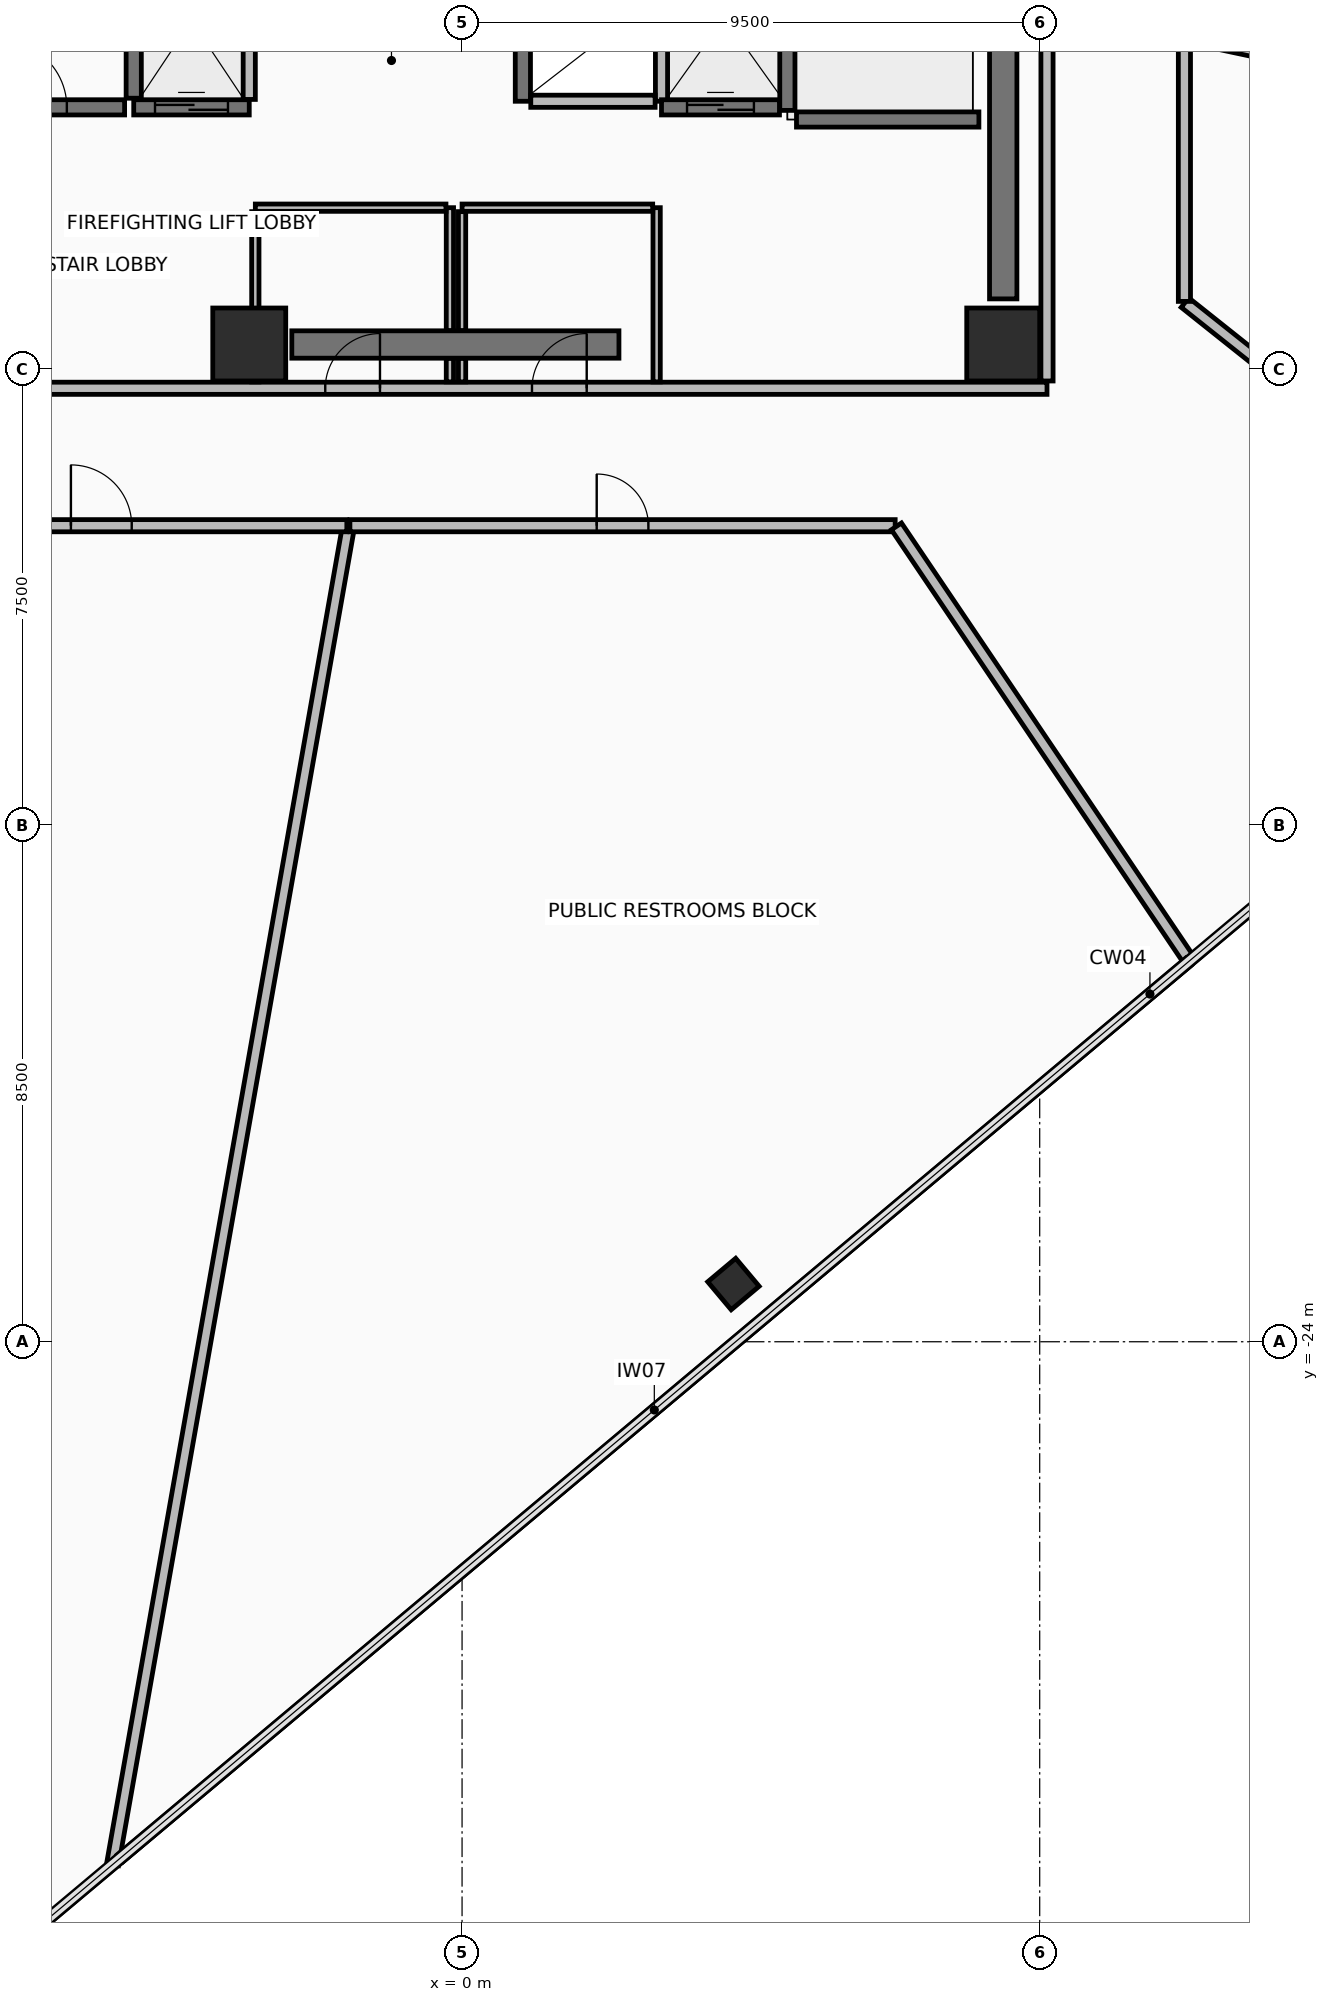
"""IFC4 building model, lengths in metres.
Left out: names, types, materials, properties, quantities, classifications, styles, units other than length and angle.
Written with IfcOpenShell. Run it as: python <this file> out.ifc"""

import sys

from ifc_helpers import new_model, si_unit, direction, frame, frame_2d, origin, origin_2d, place, context, subcontext, project, spatial, rectangle, hollow_rectangle, extrude, element, fill, save


model = new_model("IFC4")
c1 = context("Model", 3, precision=1e-05, world=origin(), true_north=direction((0.0, 1.0)))
c2 = subcontext(c1, "Body", "Model", "MODEL_VIEW")
j1 = project(units=[si_unit("LENGTHUNIT", "METRE"), si_unit("PLANEANGLEUNIT", "RADIAN")], contexts=[c1])
p1 = place(None, origin())
s1 = spatial("IfcSite", under=j1, at=p1, CompositionType="ELEMENT")
p2 = place(p1, origin())
s2 = spatial("IfcBuilding", under=s1, at=p2, CompositionType="ELEMENT")
p3 = place(p2, frame((0.0, 0.0, 181.3)))
s3 = spatial("IfcBuildingStorey", under=s2, at=p3, CompositionType="ELEMENT", Elevation=181.3)
for number, where, z_axis, x_axis in (
    (1, (-3.5, -7.6, 0.0), (0.0, 0.0, 1.0), (1.0, 0.0, 0.0)),
    (2, (8.9, -7.6, 0.0), (0.0, 0.0, 1.0), (1.0, 0.0, 0.0)),
):
    element("IfcColumn", number, at=place(p3, frame(where, z_axis=z_axis, x_axis=x_axis)), inside=s3, PredefinedType="COLUMN", context=c2, shape_type="SweptSolid", body=[
        extrude(rectangle(XDim=1.2, YDim=1.2, at=origin_2d()), origin(), (0.0, 0.0, 1.0), 3.6),
    ])
p4 = place(p3, frame((4.463, -23.051, 0.0), z_axis=(0.0, 0.0, 1.0), x_axis=(0.766043321242, 0.642788946685, 0.0)))
e3 = element("IfcColumn", 3, at=p4, inside=s3, PredefinedType="COLUMN", context=c2, shape_type="SweptSolid", body=[
    extrude(hollow_rectangle(XDim=0.6, YDim=0.6, WallThickness=0.036, at=origin_2d()), origin(), (0.0, 0.0, 1.0), 3.6),
])
p5 = place(p3, frame((-2.8, -7.6, 0.0), z_axis=(0.0, 0.0, 1.0), x_axis=(1.0, 0.0, 0.0)))
e4 = element("IfcWall", 4, at=p5, inside=s3, PredefinedType="SHEAR", context=c2, shape_type="SweptSolid", body=[
    extrude(rectangle(XDim=5.38, YDim=0.45, at=frame_2d((2.69, 0.0))), origin(), (0.0, 0.0, 1.0), 3.42),
])
p6 = place(p3, frame((8.9, -6.85, 0.0), z_axis=(0.0, 0.0, 1.0), x_axis=(0.0, 1.0, 0.0)))
e5 = element("IfcWall", 5, at=p6, inside=s3, PredefinedType="SHEAR", context=c2, shape_type="SweptSolid", body=[
    extrude(rectangle(XDim=10.7, YDim=0.45, at=frame_2d((5.35, 0.0))), origin(), (0.0, 0.0, 1.0), 3.42),
])
p7 = place(p3, frame((-9.62, -8.32, 0.0), z_axis=(0.0, 0.0, 1.0), x_axis=(1.0, 0.0, 0.0)))
e6 = element("IfcWall", 6, at=p7, inside=s3, PredefinedType="PARTITIONING", context=c2, shape_type="SweptSolid", body=[
    extrude(rectangle(XDim=19.24, YDim=0.2, at=frame_2d((9.62, 0.0))), origin(), (0.0, 0.0, 1.0), 2.865),
])
p8 = place(p7, frame((7.37, 0.0, 0.0)))
e7 = element("IfcOpeningElement", 7, at=p8, cuts=e6, PredefinedType="OPENING", context=c2, shape_type="SweptSolid", body=[
    extrude(rectangle(XDim=0.9, YDim=2.1, at=frame_2d((0.45, 1.05))), frame((0.0, 0.11, 0.0), z_axis=(0.0, -1.0, 0.0), x_axis=(1.0, 0.0, 0.0)), (0.0, 0.0, 1.0), 0.22),
])
p9 = place(p7, frame((10.77, 0.0, 0.0)))
e8 = element("IfcOpeningElement", 8, at=p9, cuts=e6, PredefinedType="OPENING", context=c2, shape_type="SweptSolid", body=[
    extrude(rectangle(XDim=0.9, YDim=2.1, at=frame_2d((0.45, 1.05))), frame((0.0, 0.11, 0.0), z_axis=(0.0, -1.0, 0.0), x_axis=(1.0, 0.0, 0.0)), (0.0, 0.0, 1.0), 0.22),
])
p10 = place(p3, frame((9.62, -8.2, 0.0), z_axis=(0.0, 0.0, 1.0), x_axis=(0.0, 1.0, 0.0)))
e9 = element("IfcWall", 9, at=p10, inside=s3, PredefinedType="PARTITIONING", context=c2, shape_type="SweptSolid", body=[
    extrude(rectangle(XDim=16.4, YDim=0.2, at=frame_2d((8.2, 0.0))), origin(), (0.0, 0.0, 1.0), 2.865),
])
p11 = place(p10, frame((12.65, 0.0, 0.0)))
e10 = element("IfcOpeningElement", 10, at=p11, cuts=e9, PredefinedType="OPENING", context=c2, shape_type="SweptSolid", body=[
    extrude(rectangle(XDim=1.1, YDim=2.15, at=frame_2d((0.55, 1.075))), frame((0.0, 0.11, 0.0), z_axis=(0.0, -1.0, 0.0), x_axis=(1.0, 0.0, 0.0)), (0.0, 0.0, 1.0), 0.22),
])
p12 = place(p3, frame((-5.4, -3.55, 0.0), z_axis=(0.0, 0.0, 1.0), x_axis=(0.0, 1.0, 0.0)))
e11 = element("IfcWall", 11, at=p12, inside=s3, PredefinedType="SHEAR", context=c2, shape_type="SweptSolid", body=[
    extrude(rectangle(XDim=7.3, YDim=0.25, at=frame_2d((3.65, 0.0))), origin(), (0.0, 0.0, 1.0), 3.42),
])
p13 = place(p3, frame((-8.5, -3.7, 0.0), z_axis=(0.0, 0.0, 1.0), x_axis=(1.0, 0.0, 0.0)))
e12 = element("IfcWall", 12, at=p13, inside=s3, PredefinedType="SHEAR", context=c2, shape_type="SweptSolid", body=[
    extrude(rectangle(XDim=2.95, YDim=0.25, at=frame_2d((1.475, 0.0))), origin(), (0.0, 0.0, 1.0), 3.42),
])
p14 = place(p13, frame((0.9, 0.0, 0.0)))
e13 = element("IfcOpeningElement", 13, at=p14, cuts=e12, PredefinedType="OPENING", context=c2, shape_type="SweptSolid", body=[
    extrude(rectangle(XDim=1.1, YDim=2.15, at=frame_2d((0.55, 1.075))), frame((0.0, 0.135, 0.0), z_axis=(0.0, -1.0, 0.0), x_axis=(1.0, 0.0, 0.0)), (0.0, 0.0, 1.0), 0.27),
])
p15 = place(p3, frame((5.35, -3.75, 0.0), z_axis=(0.0, 0.0, 1.0), x_axis=(0.0, 1.0, 0.0)))
e14 = element("IfcWall", 14, at=p15, inside=s3, PredefinedType="SHEAR", context=c2, shape_type="SweptSolid", body=[
    extrude(rectangle(XDim=7.3, YDim=0.25, at=frame_2d((3.65, 0.0))), origin(), (0.0, 0.0, 1.0), 3.42),
])
p16 = place(p3, frame((5.5, -3.9, 0.0), z_axis=(0.0, 0.0, 1.0), x_axis=(1.0, 0.0, 0.0)))
e15 = element("IfcWall", 15, at=p16, inside=s3, PredefinedType="SHEAR", context=c2, shape_type="SweptSolid", body=[
    extrude(rectangle(XDim=3.0, YDim=0.25, at=frame_2d((1.5, 0.0))), origin(), (0.0, 0.0, 1.0), 3.42),
])
p17 = place(p3, frame((1.0, -3.6, 0.0), z_axis=(0.0, 0.0, 1.0), x_axis=(0.0, 1.0, 0.0)))
e16 = element("IfcWall", 16, at=p17, inside=s3, PredefinedType="SHEAR", context=c2, shape_type="SweptSolid", body=[
    extrude(rectangle(XDim=1.8, YDim=0.25, at=frame_2d((0.9, 0.0))), origin(), (0.0, 0.0, 1.0), 3.42),
])
p18 = place(p3, frame((3.28, -3.6, 0.0), z_axis=(0.0, 0.0, 1.0), x_axis=(0.0, 1.0, 0.0)))
e17 = element("IfcWall", 17, at=p18, inside=s3, PredefinedType="PARTITIONING", context=c2, shape_type="SweptSolid", body=[
    extrude(rectangle(XDim=1.8, YDim=0.2, at=frame_2d((0.9, 0.0))), origin(), (0.0, 0.0, 1.0), 3.42),
])
p19 = place(p3, frame((1.13, -3.6, 0.0), z_axis=(0.0, 0.0, 1.0), x_axis=(1.0, 0.0, 0.0)))
e18 = element("IfcWall", 18, at=p19, inside=s3, PredefinedType="PARTITIONING", context=c2, shape_type="SweptSolid", body=[
    extrude(rectangle(XDim=2.045, YDim=0.2, at=frame_2d((1.022, 0.0))), origin(), (0.0, 0.0, 1.0), 3.42),
])
p20 = place(p3, frame((-5.4, -3.7, 0.0), z_axis=(0.0, 0.0, 1.0), x_axis=(1.0, 0.0, 0.0)))
e19 = element("IfcWall", 19, at=p20, inside=s3, PredefinedType="SHEAR", context=c2, shape_type="SweptSolid", body=[
    extrude(rectangle(XDim=1.9, YDim=0.25, at=frame_2d((0.95, 0.0))), origin(), (0.0, 0.0, 1.0), 3.42),
])
p21 = place(p20, frame((0.35, 0.0, 0.0)))
e20 = element("IfcOpeningElement", 20, at=p21, cuts=e19, PredefinedType="OPENING", context=c2, shape_type="SweptSolid", body=[
    extrude(rectangle(XDim=1.2, YDim=2.2, at=frame_2d((0.6, 1.1))), frame((0.0, 0.135, 0.0), z_axis=(0.0, -1.0, 0.0), x_axis=(1.0, 0.0, 0.0)), (0.0, 0.0, 1.0), 0.27),
])
p22 = place(p3, frame((-3.5, -3.57, 0.0), z_axis=(0.0, 0.0, 1.0), x_axis=(0.0, 1.0, 0.0)))
e21 = element("IfcWall", 21, at=p22, inside=s3, PredefinedType="PARTITIONING", context=c2, shape_type="SweptSolid", body=[
    extrude(rectangle(XDim=2.615, YDim=0.2, at=frame_2d((1.308, 0.0))), origin(), (0.0, 0.0, 1.0), 3.42),
])
p23 = place(p3, frame((3.28, -3.7, 0.0), z_axis=(0.0, 0.0, 1.0), x_axis=(1.0, 0.0, 0.0)))
e22 = element("IfcWall", 22, at=p23, inside=s3, PredefinedType="SHEAR", context=c2, shape_type="SweptSolid", body=[
    extrude(rectangle(XDim=1.94, YDim=0.25, at=frame_2d((0.97, 0.0))), origin(), (0.0, 0.0, 1.0), 3.42),
])
p24 = place(p23, frame((0.42, 0.0, 0.0)))
e23 = element("IfcOpeningElement", 23, at=p24, cuts=e22, PredefinedType="OPENING", context=c2, shape_type="SweptSolid", body=[
    extrude(rectangle(XDim=1.1, YDim=2.2, at=frame_2d((0.55, 1.1))), frame((0.0, 0.135, 0.0), z_axis=(0.0, -1.0, 0.0), x_axis=(1.0, 0.0, 0.0)), (0.0, 0.0, 1.0), 0.27),
])
p25 = place(p3, frame((-0.2, -8.215, 0.0), z_axis=(0.0, 0.0, 1.0), x_axis=(0.0, 1.0, 0.0)))
e24 = element("IfcWall", 24, at=p25, inside=s3, PredefinedType="PARTITIONING", context=c2, shape_type="SweptSolid", body=[
    extrude(rectangle(XDim=0.385, YDim=0.12, at=frame_2d((0.192, 0.0))), origin(), (0.0, 0.0, 1.0), 2.715),
])
p26 = place(p3, frame((-0.2, -7.37, 0.0), z_axis=(0.0, 0.0, 1.0), x_axis=(0.0, 1.0, 0.0)))
e25 = element("IfcWall", 25, at=p26, inside=s3, PredefinedType="PARTITIONING", context=c2, shape_type="SweptSolid", body=[
    extrude(rectangle(XDim=2.02, YDim=0.12, at=frame_2d((1.01, 0.0))), origin(), (0.0, 0.0, 1.0), 2.715),
])
p27 = place(p3, frame((-0.265, -5.35, 0.0), z_axis=(0.0, 0.0, 1.0), x_axis=(-1.0, 0.0, 0.0)))
e26 = element("IfcWall", 26, at=p27, inside=s3, PredefinedType="PARTITIONING", context=c2, shape_type="SweptSolid", body=[
    extrude(rectangle(XDim=3.135, YDim=0.12, at=frame_2d((1.567, 0.0))), origin(), (0.0, 0.0, 1.0), 2.715),
])
p28 = place(p3, frame((-3.4, -5.415, 0.0), z_axis=(0.0, 0.0, 1.0), x_axis=(0.0, -1.0, 0.0)))
e27 = element("IfcWall", 27, at=p28, inside=s3, PredefinedType="PARTITIONING", context=c2, shape_type="SweptSolid", body=[
    extrude(rectangle(XDim=2.8, YDim=0.12, at=frame_2d((1.4, 0.0))), origin(), (0.0, 0.0, 1.0), 2.715),
])
p29 = place(p3, frame((3.2, -8.215, 0.0), z_axis=(0.0, 0.0, 1.0), x_axis=(0.0, 1.0, 0.0)))
e28 = element("IfcWall", 28, at=p29, inside=s3, PredefinedType="PARTITIONING", context=c2, shape_type="SweptSolid", body=[
    extrude(rectangle(XDim=2.865, YDim=0.12, at=frame_2d((1.433, 0.0))), origin(), (0.0, 0.0, 1.0), 2.715),
])
p30 = place(p3, frame((3.135, -5.35, 0.0), z_axis=(0.0, 0.0, 1.0), x_axis=(-1.0, 0.0, 0.0)))
e29 = element("IfcWall", 29, at=p30, inside=s3, PredefinedType="PARTITIONING", context=c2, shape_type="SweptSolid", body=[
    extrude(rectangle(XDim=3.135, YDim=0.12, at=frame_2d((1.567, 0.0))), origin(), (0.0, 0.0, 1.0), 3.42),
])
p31 = place(p3, frame((0.0, -5.415, 0.0), z_axis=(0.0, 0.0, 1.0), x_axis=(0.0, -1.0, 0.0)))
e30 = element("IfcWall", 30, at=p31, inside=s3, PredefinedType="PARTITIONING", context=c2, shape_type="SweptSolid", body=[
    extrude(rectangle(XDim=1.955, YDim=0.12, at=frame_2d((0.978, 0.0))), origin(), (0.0, 0.0, 1.0), 2.715),
])
p32 = place(p3, frame((0.0, -7.83, 0.0), z_axis=(0.0, 0.0, 1.0), x_axis=(0.0, -1.0, 0.0)))
e31 = element("IfcWall", 31, at=p32, inside=s3, PredefinedType="PARTITIONING", context=c2, shape_type="SweptSolid", body=[
    extrude(rectangle(XDim=0.385, YDim=0.12, at=frame_2d((0.192, 0.0))), origin(), (0.0, 0.0, 1.0), 2.715),
])
p33 = place(p3, frame((-5.748, -32.598, 0.0), z_axis=(0.0, 0.0, 1.0), x_axis=(0.17364192413, 0.984808855659, 0.0)))
e32 = element("IfcWall", 32, at=p33, inside=s3, PredefinedType="PARTITIONING", context=c2, shape_type="SweptSolid", body=[
    extrude(rectangle(XDim=22.337, YDim=0.2, at=frame_2d((11.168, 0.0))), origin(), (0.0, 0.0, 1.0), 2.715),
])
p34 = place(p3, frame((-1.844, -10.58, 0.0), z_axis=(0.0, 0.0, 1.0), x_axis=(1.0, 0.0, 0.0)))
e33 = element("IfcWall", 33, at=p34, inside=s3, PredefinedType="PARTITIONING", context=c2, shape_type="SweptSolid", body=[
    extrude(rectangle(XDim=8.968, YDim=0.2, at=frame_2d((4.484, 0.0))), origin(), (0.0, 0.0, 1.0), 3.42),
])
p35 = place(p34, frame((4.059, 0.0, 0.0)))
e34 = element("IfcOpeningElement", 34, at=p35, cuts=e33, PredefinedType="OPENING", context=c2, shape_type="SweptSolid", body=[
    extrude(rectangle(XDim=0.85, YDim=2.1, at=frame_2d((0.425, 1.05))), frame((0.0, 0.11, 0.0), z_axis=(0.0, -1.0, 0.0), x_axis=(1.0, 0.0, 0.0)), (0.0, 0.0, 1.0), 0.22),
])
p36 = place(p3, frame((7.144, -10.591, 0.0), z_axis=(0.0, 0.0, 1.0), x_axis=(0.559187972466, -0.829040898539, 0.0)))
e35 = element("IfcWall", 35, at=p36, inside=s3, PredefinedType="PARTITIONING", context=c2, shape_type="SweptSolid", body=[
    extrude(rectangle(XDim=8.597, YDim=0.2, at=frame_2d((4.298, 0.0))), origin(), (0.0, 0.0, 1.0), 2.715),
])
p37 = place(p3, frame((11.946, -17.751, 0.0), z_axis=(0.0, 0.0, 1.0), x_axis=(-0.76604510754, -0.64278681786, 0.0)))
e36 = element("IfcWall", 36, at=p37, inside=s3, PredefinedType="PARTITIONING", context=c2, shape_type="SweptSolid", body=[
    extrude(rectangle(XDim=22.935, YDim=0.15, at=frame_2d((11.467, 0.0))), origin(), (0.0, 0.0, 1.0), 3.42),
])
p38 = place(p3, frame((-9.97, -10.58, 0.0), z_axis=(0.0, 0.0, 1.0), x_axis=(1.0, 0.0, 0.0)))
e37 = element("IfcWall", 37, at=p38, inside=s3, PredefinedType="PARTITIONING", context=c2, shape_type="SweptSolid", body=[
    extrude(rectangle(XDim=8.075, YDim=0.2, at=frame_2d((4.037, 0.0))), origin(), (0.0, 0.0, 1.0), 2.865),
])
p39 = place(p38, frame((3.537, 0.0, 0.0)))
e38 = element("IfcOpeningElement", 38, at=p39, cuts=e37, PredefinedType="OPENING", context=c2, shape_type="SweptSolid", body=[
    extrude(rectangle(XDim=1.0, YDim=2.15, at=frame_2d((0.5, 1.075))), frame((0.0, 0.11, 0.0), z_axis=(0.0, -1.0, 0.0), x_axis=(1.0, 0.0, 0.0)), (0.0, 0.0, 1.0), 0.22),
])
p40 = place(p3, frame((18.548, -12.211, 0.0), z_axis=(0.0, 0.0, 1.0), x_axis=(-0.782380574332, 0.622800639778, 0.0)))
e39 = element("IfcWall", 39, at=p40, inside=s3, PredefinedType="PARTITIONING", context=c2, shape_type="SweptSolid", body=[
    extrude(rectangle(XDim=8.511, YDim=0.2, at=frame_2d((4.255, 0.0))), origin(), (0.0, 0.0, 1.0), 2.715),
])
p41 = place(p40, frame((3.655, 0.0, 0.0)))
e40 = element("IfcOpeningElement", 40, at=p41, cuts=e39, PredefinedType="OPENING", context=c2, shape_type="SweptSolid", body=[
    extrude(rectangle(XDim=1.2, YDim=2.15, at=frame_2d((0.6, 1.075))), frame((0.0, 0.11, 0.0), z_axis=(0.0, -1.0, 0.0), x_axis=(1.0, 0.0, 0.0)), (0.0, 0.0, 1.0), 0.22),
])
p42 = place(p3, frame((11.88, -6.891, 0.0), z_axis=(0.0, 0.0, 1.0), x_axis=(0.0, 1.0, 0.0)))
e41 = element("IfcWall", 41, at=p42, inside=s3, PredefinedType="PARTITIONING", context=c2, shape_type="SweptSolid", body=[
    extrude(rectangle(XDim=4.335, YDim=0.2, at=frame_2d((2.168, 0.0))), origin(), (0.0, 0.0, 1.0), 2.865),
])
p43 = place(p3, frame((11.91, -2.531, 0.0), z_axis=(0.0, 0.0, 1.0), x_axis=(0.978146920781, -0.207914889719, 0.0)))
e42 = element("IfcWall", 42, at=p43, inside=s3, PredefinedType="PARTITIONING", context=c2, shape_type="SweptSolid", body=[
    extrude(rectangle(XDim=14.825, YDim=0.2, at=frame_2d((7.412, 0.0))), origin(), (0.0, 0.0, 1.0), 2.715),
])
p44 = place(p14, origin())
e43 = element("IfcDoor", 43, at=p44, inside=s3, OperationType="SINGLE_SWING_LEFT", PredefinedType="DOOR", context=c2, shape_type="SweptSolid", body=[
    extrude(rectangle(XDim=1.1, YDim=2.15, at=frame_2d((0.55, 1.075))), frame((0.0, 0.025, 0.0), z_axis=(0.0, -1.0, 0.0), x_axis=(1.0, 0.0, 0.0)), (0.0, 0.0, 1.0), 0.05),
])
fill(e13, e43)
p45 = place(p21, origin())
e44 = element("IfcDoor", 44, at=p45, inside=s3, OperationType="SLIDING_TO_RIGHT", PredefinedType="DOOR", context=c2, shape_type="SweptSolid", body=[
    extrude(rectangle(XDim=1.2, YDim=2.2, at=frame_2d((0.6, 1.1))), frame((0.0, 0.025, 0.0), z_axis=(0.0, -1.0, 0.0), x_axis=(1.0, 0.0, 0.0)), (0.0, 0.0, 1.0), 0.05),
])
fill(e20, e44)
p46 = place(p24, origin())
e45 = element("IfcDoor", 45, at=p46, inside=s3, OperationType="SLIDING_TO_LEFT", PredefinedType="DOOR", context=c2, shape_type="SweptSolid", body=[
    extrude(rectangle(XDim=1.1, YDim=2.2, at=frame_2d((0.55, 1.1))), frame((0.0, 0.025, 0.0), z_axis=(0.0, -1.0, 0.0), x_axis=(1.0, 0.0, 0.0)), (0.0, 0.0, 1.0), 0.05),
])
fill(e23, e45)
p47 = place(p8, frame((0.9, 0.0, 0.0), z_axis=(0.0, 0.0, 1.0), x_axis=(-1.0, 0.0, 0.0)))
e46 = element("IfcDoor", 46, at=p47, inside=s3, OperationType="SINGLE_SWING_LEFT", PredefinedType="DOOR", context=c2, shape_type="SweptSolid", body=[
    extrude(rectangle(XDim=0.9, YDim=2.1, at=frame_2d((0.45, 1.05))), frame((0.0, 0.025, 0.0), z_axis=(0.0, -1.0, 0.0), x_axis=(1.0, 0.0, 0.0)), (0.0, 0.0, 1.0), 0.05),
])
fill(e7, e46)
p48 = place(p9, frame((0.9, 0.0, 0.0), z_axis=(0.0, 0.0, 1.0), x_axis=(-1.0, 0.0, 0.0)))
e47 = element("IfcDoor", 47, at=p48, inside=s3, OperationType="SINGLE_SWING_LEFT", PredefinedType="DOOR", context=c2, shape_type="SweptSolid", body=[
    extrude(rectangle(XDim=0.9, YDim=2.1, at=frame_2d((0.45, 1.05))), frame((0.0, 0.025, 0.0), z_axis=(0.0, -1.0, 0.0), x_axis=(1.0, 0.0, 0.0)), (0.0, 0.0, 1.0), 0.05),
])
fill(e8, e47)
p49 = place(p35, origin())
e48 = element("IfcDoor", 48, at=p49, inside=s3, OperationType="SINGLE_SWING_RIGHT", PredefinedType="DOOR", context=c2, shape_type="SweptSolid", body=[
    extrude(rectangle(XDim=0.85, YDim=2.1, at=frame_2d((0.425, 1.05))), frame((0.0, 0.025, 0.0), z_axis=(0.0, -1.0, 0.0), x_axis=(1.0, 0.0, 0.0)), (0.0, 0.0, 1.0), 0.05),
])
fill(e34, e48)
p50 = place(p39, origin())
e49 = element("IfcDoor", 49, at=p50, inside=s3, OperationType="SINGLE_SWING_RIGHT", PredefinedType="DOOR", context=c2, shape_type="SweptSolid", body=[
    extrude(rectangle(XDim=1.0, YDim=2.15, at=frame_2d((0.5, 1.075))), frame((0.0, 0.025, 0.0), z_axis=(0.0, -1.0, 0.0), x_axis=(1.0, 0.0, 0.0)), (0.0, 0.0, 1.0), 0.05),
])
fill(e38, e49)
save(model, sys.argv[1])
